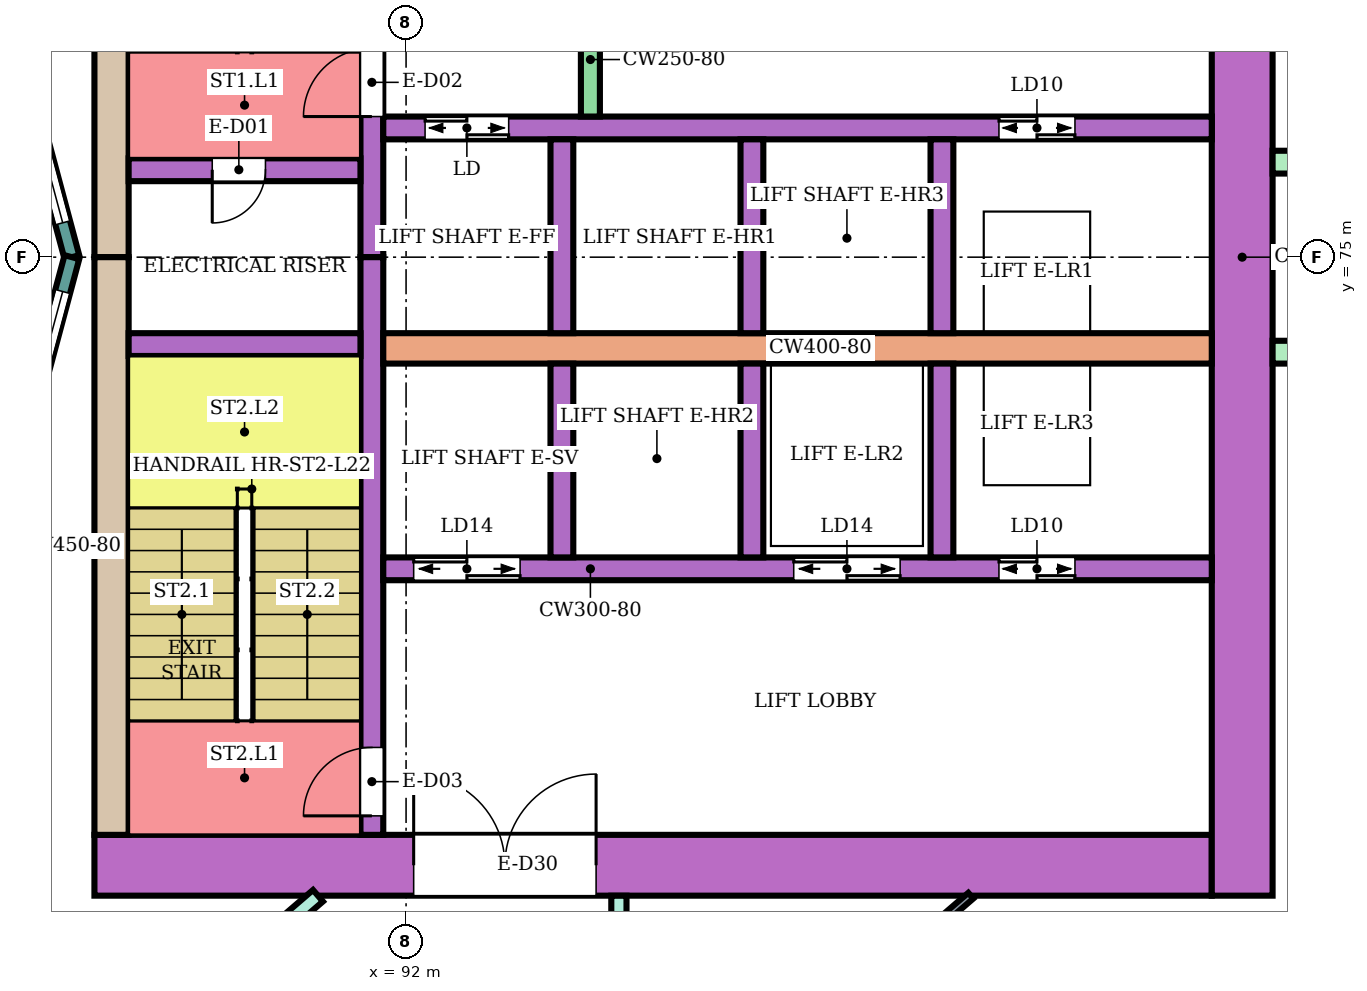
"""IFC4 building model, lengths in metres.
Left out: names, types, materials, properties, quantities, classifications, styles, units other than length and angle.
Written with IfcOpenShell. Run it as: python <this file> out.ifc"""

import sys

from ifc_helpers import new_model, si_unit, direction, frame, frame_2d, origin, place, context, subcontext, project, spatial, rectangle, extrude, element, fill, save


model = new_model("IFC4")
c1 = context("Model", 3, precision=1e-05, world=origin(), true_north=direction((0.0, 1.0)))
c2 = subcontext(c1, "Body", "Model", "MODEL_VIEW")
j1 = project(units=[si_unit("LENGTHUNIT", "METRE"), si_unit("PLANEANGLEUNIT", "RADIAN")], contexts=[c1])
p1 = place(None, origin())
s1 = spatial("IfcSite", under=j1, at=p1, CompositionType="ELEMENT")
p2 = place(p1, origin())
s2 = spatial("IfcBuilding", under=s1, at=p2, CompositionType="ELEMENT")
p3 = place(p2, frame((0.0, 0.0, 97.6)))
s3 = spatial("IfcBuildingStorey", under=s2, at=p3, CompositionType="ELEMENT", Elevation=97.6)
p4 = place(p3, frame((87.9, 67.0, 0.0), z_axis=(0.0, 0.0, 1.0), x_axis=(1.0, 0.0, 0.0)))
e1 = element("IfcWall", 1, at=p4, inside=s3, PredefinedType="SHEAR", context=c2, shape_type="SweptSolid", body=[
    extrude(rectangle(XDim=14.7, YDim=0.8, at=frame_2d((7.35, 0.0))), origin(), (0.0, 0.0, 1.0), 3.48),
])
p5 = place(p4, frame((4.2, 0.0, 0.0)))
e2 = element("IfcOpeningElement", 2, at=p5, cuts=e1, PredefinedType="OPENING", context=c2, shape_type="SweptSolid", body=[
    extrude(rectangle(XDim=2.4, YDim=2.4, at=frame_2d((1.2, 1.2))), frame((0.0, 0.41, 0.0), z_axis=(0.0, -1.0, 0.0), x_axis=(1.0, 0.0, 0.0)), (0.0, 0.0, 1.0), 0.82),
])
for number, where, z_axis, x_axis in (
    (3, (88.125, 75.0, 0.0), (0.0, 0.0, 1.0), (0.0, 1.0, 0.0)),
    (4, (88.125, 67.4, 0.0), (0.0, 0.0, 1.0), (0.0, 1.0, 0.0)),
):
    element("IfcWall", number, at=place(p3, frame(where, z_axis=z_axis, x_axis=x_axis)), inside=s3, PredefinedType="SHEAR", context=c2, shape_type="SweptSolid", body=[
        extrude(rectangle(XDim=7.6, YDim=0.45, at=frame_2d((3.8, 0.0))), origin(), (0.0, 0.0, 1.0), 3.48),
    ])
p6 = place(p3, frame((103.0, 66.6, 0.0), z_axis=(0.0, 0.0, 1.0), x_axis=(0.0, 1.0, 0.0)))
e5 = element("IfcWall", 5, at=p6, inside=s3, PredefinedType="SHEAR", context=c2, shape_type="SweptSolid", body=[
    extrude(rectangle(XDim=16.8, YDim=0.8, at=frame_2d((8.4, 0.0))), origin(), (0.0, 0.0, 1.0), 3.48),
])
p7 = place(p3, frame((91.55, 75.0, 0.0), z_axis=(0.0, 0.0, 1.0), x_axis=(0.0, 1.0, 0.0)))
e6 = element("IfcWall", 6, at=p7, inside=s3, PredefinedType="SHEAR", context=c2, shape_type="SweptSolid", body=[
    extrude(rectangle(XDim=7.6, YDim=0.3, at=frame_2d((3.8, 0.0))), origin(), (0.0, 0.0, 1.0), 3.48),
])
p8 = place(p7, frame((1.85, 0.0, 0.0)))
e7 = element("IfcOpeningElement", 7, at=p8, cuts=e6, PredefinedType="OPENING", context=c2, shape_type="SweptSolid", body=[
    extrude(rectangle(XDim=0.9, YDim=2.1, at=frame_2d((0.45, 1.05))), frame((0.0, 0.16, 0.0), z_axis=(0.0, -1.0, 0.0), x_axis=(1.0, 0.0, 0.0)), (0.0, 0.0, 1.0), 0.32),
])
p9 = place(p3, frame((91.55, 67.4, 0.0), z_axis=(0.0, 0.0, 1.0), x_axis=(0.0, 1.0, 0.0)))
e8 = element("IfcWall", 8, at=p9, inside=s3, PredefinedType="SHEAR", context=c2, shape_type="SweptSolid", body=[
    extrude(rectangle(XDim=7.6, YDim=0.3, at=frame_2d((3.8, 0.0))), origin(), (0.0, 0.0, 1.0), 3.48),
])
p10 = place(p9, frame((0.25, 0.0, 0.0)))
e9 = element("IfcOpeningElement", 9, at=p10, cuts=e8, PredefinedType="OPENING", context=c2, shape_type="SweptSolid", body=[
    extrude(rectangle(XDim=0.9, YDim=2.1, at=frame_2d((0.45, 1.05))), frame((0.0, 0.16, 0.0), z_axis=(0.0, -1.0, 0.0), x_axis=(1.0, 0.0, 0.0)), (0.0, 0.0, 1.0), 0.32),
])
p11 = place(p3, frame((88.35, 76.15, 0.0), z_axis=(0.0, 0.0, 1.0), x_axis=(1.0, 0.0, 0.0)))
e10 = element("IfcWall", 10, at=p11, inside=s3, PredefinedType="SHEAR", context=c2, shape_type="SweptSolid", body=[
    extrude(rectangle(XDim=3.05, YDim=0.3, at=frame_2d((1.525, 0.0))), origin(), (0.0, 0.0, 1.0), 3.48),
])
p12 = place(p11, frame((1.1, 0.0, 0.0)))
e11 = element("IfcOpeningElement", 11, at=p12, cuts=e10, PredefinedType="OPENING", context=c2, shape_type="SweptSolid", body=[
    extrude(rectangle(XDim=0.7, YDim=2.0, at=frame_2d((0.35, 1.0))), frame((0.0, 0.16, 0.0), z_axis=(0.0, -1.0, 0.0), x_axis=(1.0, 0.0, 0.0)), (0.0, 0.0, 1.0), 0.32),
])
p13 = place(p3, frame((88.35, 73.85, 0.0), z_axis=(0.0, 0.0, 1.0), x_axis=(1.0, 0.0, 0.0)))
e12 = element("IfcWall", 12, at=p13, inside=s3, PredefinedType="SHEAR", context=c2, shape_type="SweptSolid", body=[
    extrude(rectangle(XDim=3.05, YDim=0.3, at=frame_2d((1.525, 0.0))), origin(), (0.0, 0.0, 1.0), 3.48),
])
p14 = place(p3, frame((91.7, 76.7, 0.0), z_axis=(0.0, 0.0, 1.0), x_axis=(1.0, 0.0, 0.0)))
e13 = element("IfcWall", 13, at=p14, inside=s3, PredefinedType="SHEAR", context=c2, shape_type="SweptSolid", body=[
    extrude(rectangle(XDim=10.9, YDim=0.3, at=frame_2d((5.45, 0.0))), origin(), (0.0, 0.0, 1.0), 3.48),
])
p15 = place(p14, frame((0.55, 0.0, 0.0)))
e14 = element("IfcOpeningElement", 14, at=p15, cuts=e13, PredefinedType="OPENING", context=c2, shape_type="SweptSolid", body=[
    extrude(rectangle(XDim=1.1, YDim=2.1, at=frame_2d((0.55, 1.05))), frame((0.0, 0.16, 0.0), z_axis=(0.0, -1.0, 0.0), x_axis=(1.0, 0.0, 0.0)), (0.0, 0.0, 1.0), 0.32),
])
p16 = place(p14, frame((8.1, 0.0, 0.0)))
e15 = element("IfcOpeningElement", 15, at=p16, cuts=e13, PredefinedType="OPENING", context=c2, shape_type="SweptSolid", body=[
    extrude(rectangle(XDim=1.0, YDim=2.1, at=frame_2d((0.5, 1.05))), frame((0.0, 0.16, 0.0), z_axis=(0.0, -1.0, 0.0), x_axis=(1.0, 0.0, 0.0)), (0.0, 0.0, 1.0), 0.32),
])
p17 = place(p3, frame((91.7, 73.8, 0.0), z_axis=(0.0, 0.0, 1.0), x_axis=(1.0, 0.0, 0.0)))
e16 = element("IfcWall", 16, at=p17, inside=s3, PredefinedType="SHEAR", context=c2, shape_type="SweptSolid", body=[
    extrude(rectangle(XDim=10.9, YDim=0.4, at=frame_2d((5.45, 0.0))), origin(), (0.0, 0.0, 1.0), 3.48),
])
p18 = place(p3, frame((91.7, 70.9, 0.0), z_axis=(0.0, 0.0, 1.0), x_axis=(1.0, 0.0, 0.0)))
e17 = element("IfcWall", 17, at=p18, inside=s3, PredefinedType="SHEAR", context=c2, shape_type="SweptSolid", body=[
    extrude(rectangle(XDim=10.9, YDim=0.3, at=frame_2d((5.45, 0.0))), origin(), (0.0, 0.0, 1.0), 3.48),
])
p19 = place(p18, frame((0.4, 0.0, 0.0)))
e18 = element("IfcOpeningElement", 18, at=p19, cuts=e17, PredefinedType="OPENING", context=c2, shape_type="SweptSolid", body=[
    extrude(rectangle(XDim=1.4, YDim=2.1, at=frame_2d((0.7, 1.05))), frame((0.0, 0.16, 0.0), z_axis=(0.0, -1.0, 0.0), x_axis=(1.0, 0.0, 0.0)), (0.0, 0.0, 1.0), 0.32),
])
p20 = place(p18, frame((5.4, 0.0, 0.0)))
e19 = element("IfcOpeningElement", 19, at=p20, cuts=e17, PredefinedType="OPENING", context=c2, shape_type="SweptSolid", body=[
    extrude(rectangle(XDim=1.4, YDim=2.1, at=frame_2d((0.7, 1.05))), frame((0.0, 0.16, 0.0), z_axis=(0.0, -1.0, 0.0), x_axis=(1.0, 0.0, 0.0)), (0.0, 0.0, 1.0), 0.32),
])
p21 = place(p18, frame((8.1, 0.0, 0.0)))
e20 = element("IfcOpeningElement", 20, at=p21, cuts=e17, PredefinedType="OPENING", context=c2, shape_type="SweptSolid", body=[
    extrude(rectangle(XDim=1.0, YDim=2.1, at=frame_2d((0.5, 1.05))), frame((0.0, 0.16, 0.0), z_axis=(0.0, -1.0, 0.0), x_axis=(1.0, 0.0, 0.0)), (0.0, 0.0, 1.0), 0.32),
])
for number, where, z_axis, x_axis in (
    (21, (94.05, 74.0, 0.0), (0.0, 0.0, 1.0), (0.0, 1.0, 0.0)),
    (22, (96.55, 74.0, 0.0), (0.0, 0.0, 1.0), (0.0, 1.0, 0.0)),
    (23, (99.05, 74.0, 0.0), (0.0, 0.0, 1.0), (0.0, 1.0, 0.0)),
    (24, (94.05, 71.05, 0.0), (0.0, 0.0, 1.0), (0.0, 1.0, 0.0)),
    (25, (96.55, 71.05, 0.0), (0.0, 0.0, 1.0), (0.0, 1.0, 0.0)),
    (26, (99.05, 71.05, 0.0), (0.0, 0.0, 1.0), (0.0, 1.0, 0.0)),
):
    element("IfcWall", number, at=place(p3, frame(where, z_axis=z_axis, x_axis=x_axis)), inside=s3, PredefinedType="SHEAR", context=c2, shape_type="SweptSolid", body=[
        extrude(rectangle(XDim=2.55, YDim=0.3, at=frame_2d((1.275, 0.0))), origin(), (0.0, 0.0, 1.0), 3.48),
    ])
p22 = place(p3, frame((94.425, 76.85, 0.0), z_axis=(0.0, 0.0, 1.0), x_axis=(0.0, 1.0, 0.0)))
e27 = element("IfcWall", 27, at=p22, inside=s3, PredefinedType="SHEAR", context=c2, shape_type="SweptSolid", body=[
    extrude(rectangle(XDim=1.5, YDim=0.25, at=frame_2d((0.75, 0.0))), origin(), (0.0, 0.0, 1.0), 3.48),
])
for number, where, z_axis, x_axis in (
    (28, (103.4, 73.75, 0.0), (0.0, 0.0, 1.0), (1.0, 0.0, 0.0)),
    (29, (103.4, 76.25, 0.0), (0.0, 0.0, 1.0), (1.0, 0.0, 0.0)),
):
    element("IfcWall", number, at=place(p3, frame(where, z_axis=z_axis, x_axis=x_axis)), inside=s3, PredefinedType="NOTDEFINED", context=c2, shape_type="SweptSolid", body=[
        extrude(rectangle(XDim=2.416, YDim=0.3, at=frame_2d((1.208, 0.0))), origin(), (0.0, 0.0, 1.0), 3.8),
    ])
p23 = place(p3, frame((87.604, 75.0, 0.0), z_axis=(0.0, 0.0, 1.0), x_axis=(-0.258789828301, 0.965933654434, 0.0)))
e30 = element("IfcWall", 30, at=p23, inside=s3, PredefinedType="NOTDEFINED", context=c2, shape_type="SweptSolid", body=[
    extrude(rectangle(XDim=3.936, YDim=0.2, at=frame_2d((1.968, 0.0))), origin(), (0.0, 0.0, 1.0), 3.8),
])
p24 = place(p23, frame((0.468, 0.0, 0.9)))
e31 = element("IfcOpeningElement", 31, at=p24, cuts=e30, PredefinedType="OPENING", context=c2, shape_type="SweptSolid", body=[
    extrude(rectangle(XDim=3.0, YDim=2.3, at=frame_2d((1.5, 1.15))), frame((0.0, 0.11, 0.0), z_axis=(0.0, -1.0, 0.0), x_axis=(1.0, 0.0, 0.0)), (0.0, 0.0, 1.0), 0.22),
])
p25 = place(p3, frame((86.585, 71.198, 0.0), z_axis=(0.0, 0.0, 1.0), x_axis=(0.258789828301, 0.965933654434, 0.0)))
e32 = element("IfcWall", 32, at=p25, inside=s3, PredefinedType="NOTDEFINED", context=c2, shape_type="SweptSolid", body=[
    extrude(rectangle(XDim=3.936, YDim=0.2, at=frame_2d((1.968, 0.0))), origin(), (0.0, 0.0, 1.0), 3.8),
])
p26 = place(p25, frame((0.468, 0.0, 0.9)))
e33 = element("IfcOpeningElement", 33, at=p26, cuts=e32, PredefinedType="OPENING", context=c2, shape_type="SweptSolid", body=[
    extrude(rectangle(XDim=3.0, YDim=2.3, at=frame_2d((1.5, 1.15))), frame((0.0, 0.11, 0.0), z_axis=(0.0, -1.0, 0.0), x_axis=(1.0, 0.0, 0.0)), (0.0, 0.0, 1.0), 0.22),
])
p27 = place(p3, frame((86.877, 63.189, 0.0), z_axis=(0.0, 0.0, 1.0), x_axis=(0.758088707506, 0.652151448325, 0.0)))
e34 = element("IfcWall", 34, at=p27, inside=s3, PredefinedType="PARTITIONING", context=c2, shape_type="SweptSolid", body=[
    extrude(rectangle(XDim=5.229, YDim=0.2, at=frame_2d((2.615, 0.0))), origin(), (0.0, 0.0, 1.0), 3.35),
])
p28 = place(p3, frame((94.8, 65.1, 0.0), z_axis=(0.0, 0.0, 1.0), x_axis=(0.0, 1.0, 0.0)))
e35 = element("IfcWall", 35, at=p28, inside=s3, PredefinedType="PARTITIONING", context=c2, shape_type="SweptSolid", body=[
    extrude(rectangle(XDim=1.499, YDim=0.2, at=frame_2d((0.75, 0.0))), origin(), (0.0, 0.0, 1.0), 3.35),
])
p29 = place(p3, frame((93.577, 61.565, 0.0), z_axis=(0.0, 0.0, 1.0), x_axis=(0.75812140399, 0.652113438607, 0.0)))
e36 = element("IfcWall", 36, at=p29, inside=s3, PredefinedType="PARTITIONING", context=c2, shape_type="SweptSolid", body=[
    extrude(rectangle(XDim=7.72, YDim=0.1, at=frame_2d((3.86, 0.0))), origin(), (0.0, 0.0, 1.0), 3.35),
])
p30 = place(p29, frame((4.35, 0.0, 0.0)))
e37 = element("IfcOpeningElement", 37, at=p30, cuts=e36, PredefinedType="OPENING", context=c2, shape_type="SweptSolid", body=[
    extrude(rectangle(XDim=0.9, YDim=2.1, at=frame_2d((0.45, 1.05))), frame((0.0, 0.06, 0.0), z_axis=(0.0, -1.0, 0.0), x_axis=(1.0, 0.0, 0.0)), (0.0, 0.0, 1.0), 0.12),
])
p31 = place(p24, origin())
e38 = element("IfcWindow", 38, at=p31, inside=s3, PartitioningType="SINGLE_PANEL", PredefinedType="WINDOW", context=c2, shape_type="SweptSolid", body=[
    extrude(rectangle(XDim=3.0, YDim=2.3, at=frame_2d((1.5, 1.15))), frame((0.0, 0.03, 0.0), z_axis=(0.0, -1.0, 0.0), x_axis=(1.0, 0.0, 0.0)), (0.0, 0.0, 1.0), 0.06),
])
fill(e31, e38)
p32 = place(p26, origin())
e39 = element("IfcWindow", 39, at=p32, inside=s3, PartitioningType="SINGLE_PANEL", PredefinedType="WINDOW", context=c2, shape_type="SweptSolid", body=[
    extrude(rectangle(XDim=3.0, YDim=2.3, at=frame_2d((1.5, 1.15))), frame((0.0, 0.03, 0.0), z_axis=(0.0, -1.0, 0.0), x_axis=(1.0, 0.0, 0.0)), (0.0, 0.0, 1.0), 0.06),
])
fill(e33, e39)
p33 = place(p12, frame((0.7, 0.0, 0.0), z_axis=(0.0, 0.0, 1.0), x_axis=(-1.0, 0.0, 0.0)))
e40 = element("IfcDoor", 40, at=p33, inside=s3, OperationType="SINGLE_SWING_RIGHT", PredefinedType="DOOR", context=c2, shape_type="SweptSolid", body=[
    extrude(rectangle(XDim=0.7, YDim=2.0, at=frame_2d((0.35, 1.0))), frame((0.0, 0.025, 0.0), z_axis=(0.0, -1.0, 0.0), x_axis=(1.0, 0.0, 0.0)), (0.0, 0.0, 1.0), 0.05),
])
fill(e11, e40)
p34 = place(p8, origin())
e41 = element("IfcDoor", 41, at=p34, inside=s3, OperationType="SINGLE_SWING_LEFT", PredefinedType="DOOR", context=c2, shape_type="SweptSolid", body=[
    extrude(rectangle(XDim=0.9, YDim=2.1, at=frame_2d((0.45, 1.05))), frame((0.0, 0.025, 0.0), z_axis=(0.0, -1.0, 0.0), x_axis=(1.0, 0.0, 0.0)), (0.0, 0.0, 1.0), 0.05),
])
fill(e7, e41)
p35 = place(p10, origin())
e42 = element("IfcDoor", 42, at=p35, inside=s3, OperationType="SINGLE_SWING_LEFT", PredefinedType="DOOR", context=c2, shape_type="SweptSolid", body=[
    extrude(rectangle(XDim=0.9, YDim=2.1, at=frame_2d((0.45, 1.05))), frame((0.0, 0.025, 0.0), z_axis=(0.0, -1.0, 0.0), x_axis=(1.0, 0.0, 0.0)), (0.0, 0.0, 1.0), 0.05),
])
fill(e9, e42)
p36 = place(p15, origin())
e43 = element("IfcDoor", 43, at=p36, inside=s3, OperationType="DOUBLE_DOOR_SLIDING", PredefinedType="DOOR", context=c2, shape_type="SweptSolid", body=[
    extrude(rectangle(XDim=1.1, YDim=2.1, at=frame_2d((0.55, 1.05))), frame((0.0, 0.025, 0.0), z_axis=(0.0, -1.0, 0.0), x_axis=(1.0, 0.0, 0.0)), (0.0, 0.0, 1.0), 0.05),
])
fill(e14, e43)
p37 = place(p16, origin())
e44 = element("IfcDoor", 44, at=p37, inside=s3, OperationType="DOUBLE_DOOR_SLIDING", PredefinedType="DOOR", context=c2, shape_type="SweptSolid", body=[
    extrude(rectangle(XDim=1.0, YDim=2.1, at=frame_2d((0.5, 1.05))), frame((0.0, 0.025, 0.0), z_axis=(0.0, -1.0, 0.0), x_axis=(1.0, 0.0, 0.0)), (0.0, 0.0, 1.0), 0.05),
])
fill(e15, e44)
p38 = place(p19, origin())
e45 = element("IfcDoor", 45, at=p38, inside=s3, OperationType="DOUBLE_DOOR_SLIDING", PredefinedType="DOOR", context=c2, shape_type="SweptSolid", body=[
    extrude(rectangle(XDim=1.4, YDim=2.1, at=frame_2d((0.7, 1.05))), frame((0.0, 0.025, 0.0), z_axis=(0.0, -1.0, 0.0), x_axis=(1.0, 0.0, 0.0)), (0.0, 0.0, 1.0), 0.05),
])
fill(e18, e45)
p39 = place(p20, origin())
e46 = element("IfcDoor", 46, at=p39, inside=s3, OperationType="DOUBLE_DOOR_SLIDING", PredefinedType="DOOR", context=c2, shape_type="SweptSolid", body=[
    extrude(rectangle(XDim=1.4, YDim=2.1, at=frame_2d((0.7, 1.05))), frame((0.0, 0.025, 0.0), z_axis=(0.0, -1.0, 0.0), x_axis=(1.0, 0.0, 0.0)), (0.0, 0.0, 1.0), 0.05),
])
fill(e19, e46)
p40 = place(p21, origin())
e47 = element("IfcDoor", 47, at=p40, inside=s3, OperationType="DOUBLE_DOOR_SLIDING", PredefinedType="DOOR", context=c2, shape_type="SweptSolid", body=[
    extrude(rectangle(XDim=1.0, YDim=2.1, at=frame_2d((0.5, 1.05))), frame((0.0, 0.025, 0.0), z_axis=(0.0, -1.0, 0.0), x_axis=(1.0, 0.0, 0.0)), (0.0, 0.0, 1.0), 0.05),
])
fill(e20, e47)
p41 = place(p5, origin())
e48 = element("IfcDoor", 48, at=p41, inside=s3, OperationType="DOUBLE_DOOR_SINGLE_SWING", PredefinedType="DOOR", context=c2, shape_type="SweptSolid", body=[
    extrude(rectangle(XDim=2.4, YDim=2.4, at=frame_2d((1.2, 1.2))), frame((0.0, 0.025, 0.0), z_axis=(0.0, -1.0, 0.0), x_axis=(1.0, 0.0, 0.0)), (0.0, 0.0, 1.0), 0.05),
])
fill(e2, e48)
save(model, sys.argv[1])
